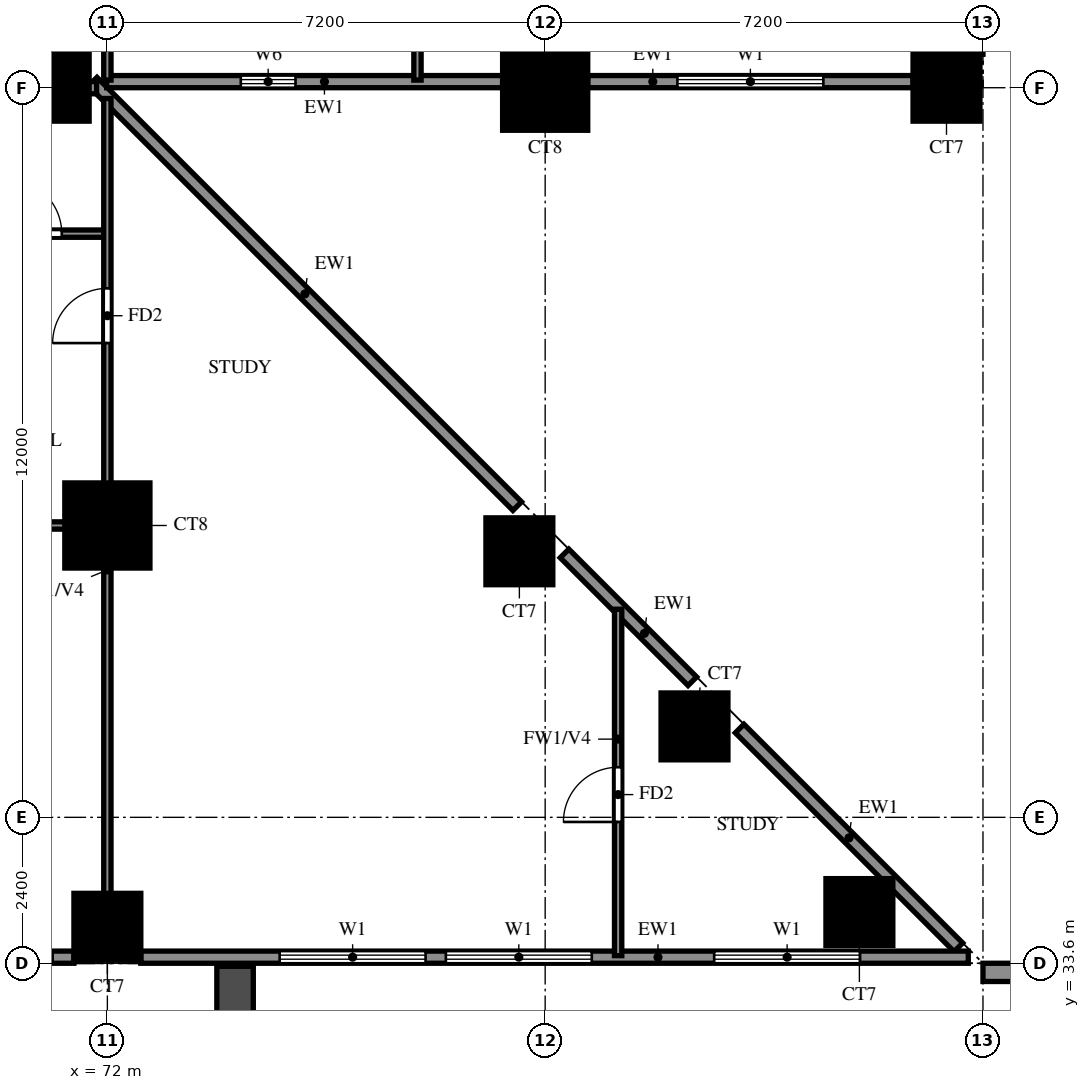
"""IFC4 building model, lengths in metres.
Left out: names, types, materials, properties, quantities, classifications, styles, units other than length and angle.
Written with IfcOpenShell. Run it as: python <this file> out.ifc"""

import sys

from ifc_helpers import new_model, si_unit, direction, frame, frame_2d, origin, origin_2d, place, context, subcontext, project, spatial, rectangle, extrude, source, transform, mapped, element, fill, save


model = new_model("IFC4")
c1 = context("Model", 3, precision=1e-05, world=origin(), true_north=direction((0.0, 1.0)))
c2 = subcontext(c1, "Body", "Model", "MODEL_VIEW")
j1 = project(units=[si_unit("LENGTHUNIT", "METRE"), si_unit("PLANEANGLEUNIT", "RADIAN")], contexts=[c1])
p1 = place(None, origin())
s1 = spatial("IfcSite", under=j1, at=p1, CompositionType="ELEMENT")
p2 = place(p1, origin())
s2 = spatial("IfcBuilding", under=s1, at=p2, CompositionType="ELEMENT")
p3 = place(p2, frame((0.0, 0.0, 48.0)))
s3 = spatial("IfcBuildingStorey", under=s2, at=p3, CompositionType="ELEMENT", Elevation=48.0)
m1 = source(origin(), c2, "Body", "SweptSolid", [
    extrude(rectangle(XDim=1.1, YDim=1.1, at=origin_2d()), origin(), (0.0, 0.0, 1.0), 3.18),
])
for number, where, z_axis, x_axis in (
    (1, (72.0, 34.2, 0.0), (0.0, 0.0, 1.0), (1.0, 0.0, 0.0)),
    (2, (84.367, 34.442, 0.0), (0.0, 0.0, 1.0), (1.0, 0.0, 0.0)),
    (3, (81.656, 37.496, 0.0), (0.0, 0.0, 1.0), (1.0, 0.0, 0.0)),
    (4, (78.776, 40.376, 0.0), (0.0, 0.0, 1.0), (1.0, 0.0, 0.0)),
):
    element("IfcColumn", number, at=place(p3, frame(where, z_axis=z_axis, x_axis=x_axis)), inside=s3, PredefinedType="COLUMN", context=c2, shape_type="MappedRepresentation", body=[
        mapped(m1, transform((0.0, 0.0, 0.0))),
    ])
m2 = source(origin(), c2, "Body", "SweptSolid", [
    extrude(rectangle(XDim=1.4, YDim=1.4, at=origin_2d()), origin(), (0.0, 0.0, 1.0), 3.18),
])
p4 = place(p3, frame((72.0, 40.8, 0.0), z_axis=(0.0, 0.0, 1.0), x_axis=(1.0, 0.0, 0.0)))
e5 = element("IfcColumn", 5, at=p4, inside=s3, PredefinedType="COLUMN", context=c2, shape_type="MappedRepresentation", body=[
    mapped(m2, transform((0.0, 0.0, 0.0))),
])
p5 = place(p3, frame((71.15, 48.0, 0.0), z_axis=(0.0, 0.0, 1.0), x_axis=(1.0, 0.0, 0.0)))
e6 = element("IfcColumn", 6, at=p5, inside=s3, PredefinedType="COLUMN", context=c2, shape_type="MappedRepresentation", body=[
    mapped(m1, transform((0.0, 0.0, 0.0))),
])
p6 = place(p3, frame((79.2, 48.0, 0.0), z_axis=(0.0, 0.0, 1.0), x_axis=(1.0, 0.0, 0.0)))
e7 = element("IfcColumn", 7, at=p6, inside=s3, PredefinedType="COLUMN", context=c2, shape_type="MappedRepresentation", body=[
    mapped(m2, transform((0.0, 0.0, 0.0))),
])
p7 = place(p3, frame((85.8, 48.0, 0.0), z_axis=(0.0, 0.0, 1.0), x_axis=(1.0, 0.0, 0.0)))
e8 = element("IfcColumn", 8, at=p7, inside=s3, PredefinedType="COLUMN", context=c2, shape_type="MappedRepresentation", body=[
    mapped(m1, transform((0.0, 0.0, 0.0))),
])
p8 = place(p3, frame((85.996, 33.863, 0.0), z_axis=(0.0, 0.0, 1.0), x_axis=(-0.7070827891, 0.707130772459, 0.0)))
e9 = element("IfcWall", 9, at=p8, inside=s3, PredefinedType="SOLIDWALL", context=c2, shape_type="SweptSolid", body=[
    extrude(rectangle(XDim=5.088, YDim=0.2, at=frame_2d((2.544, 0.0))), origin(), (0.0, 0.0, 1.0), 3.18),
])
p9 = place(p3, frame((81.62, 38.238, 0.0), z_axis=(0.0, 0.0, 1.0), x_axis=(-0.707106781187, 0.707106781187, 0.0)))
e10 = element("IfcWall", 10, at=p9, inside=s3, PredefinedType="SOLIDWALL", context=c2, shape_type="SweptSolid", body=[
    extrude(rectangle(XDim=2.973, YDim=0.2, at=frame_2d((1.486, 0.0))), origin(), (0.0, 0.0, 1.0), 3.18),
])
p10 = place(p3, frame((78.74, 41.118, 0.0), z_axis=(0.0, 0.0, 1.0), x_axis=(-0.707106781187, 0.707106781187, 0.0)))
e11 = element("IfcWall", 11, at=p10, inside=s3, PredefinedType="SOLIDWALL", context=c2, shape_type="SweptSolid", body=[
    extrude(rectangle(XDim=9.874, YDim=0.2, at=frame_2d((4.937, 0.0))), origin(), (0.0, 0.0, 1.0), 3.18),
])
p11 = place(p3, frame((71.989, 48.1, 0.0), z_axis=(0.0, 0.0, 1.0), x_axis=(1.0, 0.0, 0.0)))
e12 = element("IfcWall", 12, at=p11, inside=s3, PredefinedType="SOLIDWALL", context=c2, shape_type="SweptSolid", body=[
    extrude(rectangle(XDim=6.511, YDim=0.2, at=frame_2d((3.256, 0.0))), origin(), (0.0, 0.0, 1.0), 3.18),
])
p12 = place(p11, frame((2.206, 0.0, 1.5)))
e13 = element("IfcOpeningElement", 13, at=p12, cuts=e12, PredefinedType="OPENING", context=c2, shape_type="SweptSolid", body=[
    extrude(rectangle(XDim=0.9, YDim=0.9, at=frame_2d((0.45, 0.45))), frame((0.0, 0.11, 0.0), z_axis=(0.0, -1.0, 0.0), x_axis=(1.0, 0.0, 0.0)), (0.0, 0.0, 1.0), 0.22),
])
p13 = place(p3, frame((79.9, 48.1, 0.0), z_axis=(0.0, 0.0, 1.0), x_axis=(1.0, 0.0, 0.0)))
e14 = element("IfcWall", 14, at=p13, inside=s3, PredefinedType="SOLIDWALL", context=c2, shape_type="SweptSolid", body=[
    extrude(rectangle(XDim=5.35, YDim=0.2, at=frame_2d((2.675, 0.0))), origin(), (0.0, 0.0, 1.0), 3.18),
])
p14 = place(p13, frame((1.475, 0.0, 0.6)))
e15 = element("IfcOpeningElement", 15, at=p14, cuts=e14, PredefinedType="OPENING", context=c2, shape_type="SweptSolid", body=[
    extrude(rectangle(XDim=2.4, YDim=2.4, at=frame_2d((1.2, 1.2))), frame((0.0, 0.11, 0.0), z_axis=(0.0, -1.0, 0.0), x_axis=(1.0, 0.0, 0.0)), (0.0, 0.0, 1.0), 0.22),
])
p15 = place(p3, frame((86.3, 48.55, 0.0), z_axis=(0.0, 0.0, 1.0), x_axis=(0.0, 1.0, 0.0)))
e16 = element("IfcWall", 16, at=p15, inside=s3, PredefinedType="SOLIDWALL", context=c2, shape_type="SweptSolid", body=[
    extrude(rectangle(XDim=6.1, YDim=0.2, at=frame_2d((3.05, 0.0))), origin(), (0.0, 0.0, 1.0), 3.18),
])
p16 = place(p15, frame((0.725, 0.0, 0.6)))
e17 = element("IfcOpeningElement", 17, at=p16, cuts=e16, PredefinedType="OPENING", context=c2, shape_type="SweptSolid", body=[
    extrude(rectangle(XDim=1.8, YDim=2.4, at=frame_2d((0.9, 1.2))), frame((0.0, 0.11, 0.0), z_axis=(0.0, -1.0, 0.0), x_axis=(1.0, 0.0, 0.0)), (0.0, 0.0, 1.0), 0.22),
])
p17 = place(p15, frame((3.2, 0.0, 0.6)))
e18 = element("IfcOpeningElement", 18, at=p17, cuts=e16, PredefinedType="OPENING", context=c2, shape_type="SweptSolid", body=[
    extrude(rectangle(XDim=0.9, YDim=2.4, at=frame_2d((0.45, 1.2))), frame((0.0, 0.11, 0.0), z_axis=(0.0, -1.0, 0.0), x_axis=(1.0, 0.0, 0.0)), (0.0, 0.0, 1.0), 0.22),
])
p18 = place(p3, frame((65.35, 33.7, 0.0), z_axis=(0.0, 0.0, 1.0), x_axis=(1.0, 0.0, 0.0)))
e19 = element("IfcWall", 19, at=p18, inside=s3, PredefinedType="SOLIDWALL", context=c2, shape_type="SweptSolid", body=[
    extrude(rectangle(XDim=6.1, YDim=0.2, at=frame_2d((3.05, 0.0))), origin(), (0.0, 0.0, 1.0), 3.18),
])
p19 = place(p18, frame((3.95, 0.0, 0.0)))
e20 = element("IfcOpeningElement", 20, at=p19, cuts=e19, PredefinedType="OPENING", context=c2, shape_type="SweptSolid", body=[
    extrude(rectangle(XDim=1.8, YDim=2.4, at=frame_2d((0.9, 1.2))), frame((0.0, 0.11, 0.0), z_axis=(0.0, -1.0, 0.0), x_axis=(1.0, 0.0, 0.0)), (0.0, 0.0, 1.0), 0.22),
])
p20 = place(p18, frame((0.425, 0.0, 0.6)))
e21 = element("IfcOpeningElement", 21, at=p20, cuts=e19, PredefinedType="OPENING", context=c2, shape_type="SweptSolid", body=[
    extrude(rectangle(XDim=1.2, YDim=2.4, at=frame_2d((0.6, 1.2))), frame((0.0, 0.11, 0.0), z_axis=(0.0, -1.0, 0.0), x_axis=(1.0, 0.0, 0.0)), (0.0, 0.0, 1.0), 0.22),
])
p21 = place(p18, frame((2.6, 0.0, 0.6)))
e22 = element("IfcOpeningElement", 22, at=p21, cuts=e19, PredefinedType="OPENING", context=c2, shape_type="SweptSolid", body=[
    extrude(rectangle(XDim=0.9, YDim=2.4, at=frame_2d((0.45, 1.2))), frame((0.0, 0.11, 0.0), z_axis=(0.0, -1.0, 0.0), x_axis=(1.0, 0.0, 0.0)), (0.0, 0.0, 1.0), 0.22),
])
p22 = place(p3, frame((72.55, 33.7, 0.0), z_axis=(0.0, 0.0, 1.0), x_axis=(1.0, 0.0, 0.0)))
e23 = element("IfcWall", 23, at=p22, inside=s3, PredefinedType="SOLIDWALL", context=c2, shape_type="SweptSolid", body=[
    extrude(rectangle(XDim=13.609, YDim=0.2, at=frame_2d((6.804, 0.0))), origin(), (0.0, 0.0, 1.0), 3.18),
])
p23 = place(p22, frame((2.283, 0.0, 0.6)))
e24 = element("IfcOpeningElement", 24, at=p23, cuts=e23, PredefinedType="OPENING", context=c2, shape_type="SweptSolid", body=[
    extrude(rectangle(XDim=2.4, YDim=2.4, at=frame_2d((1.2, 1.2))), frame((0.0, 0.11, 0.0), z_axis=(0.0, -1.0, 0.0), x_axis=(1.0, 0.0, 0.0)), (0.0, 0.0, 1.0), 0.22),
])
p24 = place(p22, frame((5.017, 0.0, 0.6)))
e25 = element("IfcOpeningElement", 25, at=p24, cuts=e23, PredefinedType="OPENING", context=c2, shape_type="SweptSolid", body=[
    extrude(rectangle(XDim=2.4, YDim=2.4, at=frame_2d((1.2, 1.2))), frame((0.0, 0.11, 0.0), z_axis=(0.0, -1.0, 0.0), x_axis=(1.0, 0.0, 0.0)), (0.0, 0.0, 1.0), 0.22),
])
p25 = place(p22, frame((9.429, 0.0, 0.6)))
e26 = element("IfcOpeningElement", 26, at=p25, cuts=e23, PredefinedType="OPENING", context=c2, shape_type="SweptSolid", body=[
    extrude(rectangle(XDim=2.4, YDim=2.4, at=frame_2d((1.2, 1.2))), frame((0.0, 0.11, 0.0), z_axis=(0.0, -1.0, 0.0), x_axis=(1.0, 0.0, 0.0)), (0.0, 0.0, 1.0), 0.22),
])
p26 = place(p3, frame((86.4, 33.45, -0.32), z_axis=(0.0, 0.0, 1.0), x_axis=(1.0, 0.0, 0.0)))
e27 = element("IfcWall", 27, at=p26, inside=s3, PredefinedType="SOLIDWALL", context=c2, shape_type="SweptSolid", body=[
    extrude(rectangle(XDim=2.4, YDim=0.3, at=frame_2d((1.2, 0.0))), origin(), (0.0, 0.0, 1.0), 3.5),
])
p27 = place(p3, frame((74.1, 33.55, 0.0), z_axis=(0.0, 0.0, 1.0), x_axis=(0.0, -1.0, 0.0)))
e28 = element("IfcWall", 28, at=p27, inside=s3, PredefinedType="SOLIDWALL", context=c2, shape_type="SweptSolid", body=[
    extrude(rectangle(XDim=2.65, YDim=0.6, at=frame_2d((1.325, 0.0))), origin(), (0.0, 0.0, 1.0), 2.85),
])
p28 = place(p3, frame((67.2, 48.0, 0.0), z_axis=(0.0, 0.0, 1.0), x_axis=(1.0, 0.0, 0.0)))
e29 = element("IfcWall", 29, at=p28, inside=s3, PredefinedType="SOLIDWALL", context=c2, shape_type="SweptSolid", body=[
    extrude(rectangle(XDim=4.623, YDim=0.2, at=frame_2d((2.312, 0.0))), origin(), (0.0, 0.0, 1.0), 3.18),
])
p29 = place(p3, frame((60.0, 40.8, 0.0), z_axis=(0.0, 0.0, 1.0), x_axis=(1.0, 0.0, 0.0)))
e30 = element("IfcWall", 30, at=p29, inside=s3, PredefinedType="PARTITIONING", context=c2, shape_type="SweptSolid", body=[
    extrude(rectangle(XDim=12.0, YDim=0.12, at=frame_2d((6.0, 0.0))), origin(), (0.0, 0.0, 1.0), 3.18),
])
p30 = place(p29, frame((7.65, 0.0, 0.0)))
e31 = element("IfcOpeningElement", 31, at=p30, cuts=e30, PredefinedType="OPENING", context=c2, shape_type="SweptSolid", body=[
    extrude(rectangle(XDim=1.5, YDim=2.1, at=frame_2d((0.75, 1.05))), frame((0.0, 0.07, 0.0), z_axis=(0.0, -1.0, 0.0), x_axis=(1.0, 0.0, 0.0)), (0.0, 0.0, 1.0), 0.14),
])
p31 = place(p29, frame((1.95, 0.0, 0.0)))
e32 = element("IfcOpeningElement", 32, at=p31, cuts=e30, PredefinedType="OPENING", context=c2, shape_type="SweptSolid", body=[
    extrude(rectangle(XDim=0.9, YDim=2.1, at=frame_2d((0.45, 1.05))), frame((0.0, 0.07, 0.0), z_axis=(0.0, -1.0, 0.0), x_axis=(1.0, 0.0, 0.0)), (0.0, 0.0, 1.0), 0.14),
])
p32 = place(p3, frame((67.2, 45.6, 0.0), z_axis=(0.0, 0.0, 1.0), x_axis=(1.0, 0.0, 0.0)))
e33 = element("IfcWall", 33, at=p32, inside=s3, PredefinedType="PARTITIONING", context=c2, shape_type="SweptSolid", body=[
    extrude(rectangle(XDim=4.8, YDim=0.12, at=frame_2d((2.4, 0.0))), origin(), (0.0, 0.0, 1.0), 3.18),
])
p33 = place(p32, frame((3.15, 0.0, 0.0)))
e34 = element("IfcOpeningElement", 34, at=p33, cuts=e33, PredefinedType="OPENING", context=c2, shape_type="SweptSolid", body=[
    extrude(rectangle(XDim=0.9, YDim=2.1, at=frame_2d((0.45, 1.05))), frame((0.0, 0.07, 0.0), z_axis=(0.0, -1.0, 0.0), x_axis=(1.0, 0.0, 0.0)), (0.0, 0.0, 1.0), 0.14),
])
p34 = place(p3, frame((72.0, 33.725, 0.0), z_axis=(0.0, 0.0, 1.0), x_axis=(0.0, 1.0, 0.0)))
e35 = element("IfcWall", 35, at=p34, inside=s3, PredefinedType="PARTITIONING", context=c2, shape_type="SweptSolid", body=[
    extrude(rectangle(XDim=14.098, YDim=0.12, at=frame_2d((7.049, 0.0))), origin(), (0.0, 0.0, 1.0), 2.28),
])
p35 = place(p34, frame((10.075, 0.0, 0.0)))
e36 = element("IfcOpeningElement", 36, at=p35, cuts=e35, PredefinedType="OPENING", context=c2, shape_type="SweptSolid", body=[
    extrude(rectangle(XDim=0.9, YDim=2.1, at=frame_2d((0.45, 1.05))), frame((0.0, 0.07, 0.0), z_axis=(0.0, -1.0, 0.0), x_axis=(1.0, 0.0, 0.0)), (0.0, 0.0, 1.0), 0.14),
])
p36 = place(p3, frame((72.0, 48.125, 0.0), z_axis=(0.0, 0.0, 1.0), x_axis=(0.0, 1.0, 0.0)))
e37 = element("IfcWall", 37, at=p36, inside=s3, PredefinedType="PARTITIONING", context=c2, shape_type="SweptSolid", body=[
    extrude(rectangle(XDim=7.075, YDim=0.12, at=frame_2d((3.538, 0.0))), origin(), (0.0, 0.0, 1.0), 3.18),
])
p37 = place(p3, frame((77.1, 48.125, 0.0), z_axis=(0.0, 0.0, 1.0), x_axis=(0.0, 1.0, 0.0)))
e38 = element("IfcWall", 38, at=p37, inside=s3, PredefinedType="PARTITIONING", context=c2, shape_type="SweptSolid", body=[
    extrude(rectangle(XDim=7.075, YDim=0.12, at=frame_2d((3.538, 0.0))), origin(), (0.0, 0.0, 1.0), 3.18),
])
p38 = place(p37, frame((1.363, 0.0, 0.0)))
e39 = element("IfcOpeningElement", 39, at=p38, cuts=e38, PredefinedType="OPENING", context=c2, shape_type="SweptSolid", body=[
    extrude(rectangle(XDim=0.8, YDim=2.1, at=frame_2d((0.4, 1.05))), frame((0.0, 0.07, 0.0), z_axis=(0.0, -1.0, 0.0), x_axis=(1.0, 0.0, 0.0)), (0.0, 0.0, 1.0), 0.14),
])
p39 = place(p3, frame((79.2, 48.125, 0.0), z_axis=(0.0, 0.0, 1.0), x_axis=(0.0, 1.0, 0.0)))
e40 = element("IfcWall", 40, at=p39, inside=s3, PredefinedType="PARTITIONING", context=c2, shape_type="SweptSolid", body=[
    extrude(rectangle(XDim=17.875, YDim=0.12, at=frame_2d((8.938, 0.0))), origin(), (0.0, 0.0, 1.0), 3.18),
])
p40 = place(p39, frame((1.288, 0.0, 0.0)))
e41 = element("IfcOpeningElement", 41, at=p40, cuts=e40, PredefinedType="OPENING", context=c2, shape_type="SweptSolid", body=[
    extrude(rectangle(XDim=0.9, YDim=2.1, at=frame_2d((0.45, 1.05))), frame((0.0, 0.07, 0.0), z_axis=(0.0, -1.0, 0.0), x_axis=(1.0, 0.0, 0.0)), (0.0, 0.0, 1.0), 0.14),
])
p41 = place(p39, frame((7.825, 0.0, 0.0)))
e42 = element("IfcOpeningElement", 42, at=p41, cuts=e40, PredefinedType="OPENING", context=c2, shape_type="SweptSolid", body=[
    extrude(rectangle(XDim=1.5, YDim=2.1, at=frame_2d((0.75, 1.05))), frame((0.0, 0.07, 0.0), z_axis=(0.0, -1.0, 0.0), x_axis=(1.0, 0.0, 0.0)), (0.0, 0.0, 1.0), 0.14),
])
p42 = place(p39, frame((12.025, 0.0, 0.0)))
e43 = element("IfcOpeningElement", 43, at=p42, cuts=e40, PredefinedType="OPENING", context=c2, shape_type="SweptSolid", body=[
    extrude(rectangle(XDim=0.9, YDim=2.1, at=frame_2d((0.45, 1.05))), frame((0.0, 0.07, 0.0), z_axis=(0.0, -1.0, 0.0), x_axis=(1.0, 0.0, 0.0)), (0.0, 0.0, 1.0), 0.14),
])
p43 = place(p39, frame((15.625, 0.0, 0.0)))
e44 = element("IfcOpeningElement", 44, at=p43, cuts=e40, PredefinedType="OPENING", context=c2, shape_type="SweptSolid", body=[
    extrude(rectangle(XDim=0.9, YDim=2.1, at=frame_2d((0.45, 1.05))), frame((0.0, 0.07, 0.0), z_axis=(0.0, -1.0, 0.0), x_axis=(1.0, 0.0, 0.0)), (0.0, 0.0, 1.0), 0.14),
])
p44 = place(p3, frame((80.4, 33.725, 0.0), z_axis=(0.0, 0.0, 1.0), x_axis=(0.0, 1.0, 0.0)))
e45 = element("IfcWall", 45, at=p44, inside=s3, PredefinedType="PARTITIONING", context=c2, shape_type="SweptSolid", body=[
    extrude(rectangle(XDim=5.698, YDim=0.12, at=frame_2d((2.849, 0.0))), origin(), (0.0, 0.0, 1.0), 2.28),
])
p45 = place(p44, frame((2.199, 0.0, 0.0)))
e46 = element("IfcOpeningElement", 46, at=p45, cuts=e45, PredefinedType="OPENING", context=c2, shape_type="SweptSolid", body=[
    extrude(rectangle(XDim=0.9, YDim=2.1, at=frame_2d((0.45, 1.05))), frame((0.0, 0.07, 0.0), z_axis=(0.0, -1.0, 0.0), x_axis=(1.0, 0.0, 0.0)), (0.0, 0.0, 1.0), 0.14),
])
p46 = place(p12, origin())
e47 = element("IfcWindow", 47, at=p46, inside=s3, PartitioningType="SINGLE_PANEL", PredefinedType="WINDOW", context=c2, shape_type="SweptSolid", body=[
    extrude(rectangle(XDim=0.9, YDim=0.9, at=frame_2d((0.45, 0.45))), frame((0.0, 0.03, 0.0), z_axis=(0.0, -1.0, 0.0), x_axis=(1.0, 0.0, 0.0)), (0.0, 0.0, 1.0), 0.06),
])
fill(e13, e47)
p47 = place(p14, origin())
e48 = element("IfcWindow", 48, at=p47, inside=s3, PartitioningType="DOUBLE_PANEL_VERTICAL", PredefinedType="WINDOW", context=c2, shape_type="SweptSolid", body=[
    extrude(rectangle(XDim=2.4, YDim=2.4, at=frame_2d((1.2, 1.2))), frame((0.0, 0.03, 0.0), z_axis=(0.0, -1.0, 0.0), x_axis=(1.0, 0.0, 0.0)), (0.0, 0.0, 1.0), 0.06),
])
fill(e15, e48)
p48 = place(p23, origin())
e49 = element("IfcWindow", 49, at=p48, inside=s3, PartitioningType="DOUBLE_PANEL_VERTICAL", PredefinedType="WINDOW", context=c2, shape_type="SweptSolid", body=[
    extrude(rectangle(XDim=2.4, YDim=2.4, at=frame_2d((1.2, 1.2))), frame((0.0, 0.03, 0.0), z_axis=(0.0, -1.0, 0.0), x_axis=(1.0, 0.0, 0.0)), (0.0, 0.0, 1.0), 0.06),
])
fill(e24, e49)
p49 = place(p24, origin())
e50 = element("IfcWindow", 50, at=p49, inside=s3, PartitioningType="DOUBLE_PANEL_VERTICAL", PredefinedType="WINDOW", context=c2, shape_type="SweptSolid", body=[
    extrude(rectangle(XDim=2.4, YDim=2.4, at=frame_2d((1.2, 1.2))), frame((0.0, 0.03, 0.0), z_axis=(0.0, -1.0, 0.0), x_axis=(1.0, 0.0, 0.0)), (0.0, 0.0, 1.0), 0.06),
])
fill(e25, e50)
p50 = place(p25, origin())
e51 = element("IfcWindow", 51, at=p50, inside=s3, PartitioningType="DOUBLE_PANEL_VERTICAL", PredefinedType="WINDOW", context=c2, shape_type="SweptSolid", body=[
    extrude(rectangle(XDim=2.4, YDim=2.4, at=frame_2d((1.2, 1.2))), frame((0.0, 0.03, 0.0), z_axis=(0.0, -1.0, 0.0), x_axis=(1.0, 0.0, 0.0)), (0.0, 0.0, 1.0), 0.06),
])
fill(e26, e51)
p51 = place(p33, origin())
e52 = element("IfcDoor", 52, at=p51, inside=s3, OperationType="SINGLE_SWING_LEFT", PredefinedType="DOOR", context=c2, shape_type="SweptSolid", body=[
    extrude(rectangle(XDim=0.9, YDim=2.1, at=frame_2d((0.45, 1.05))), frame((0.0, 0.025, 0.0), z_axis=(0.0, -1.0, 0.0), x_axis=(1.0, 0.0, 0.0)), (0.0, 0.0, 1.0), 0.05),
])
fill(e34, e52)
p52 = place(p35, origin())
e53 = element("IfcDoor", 53, at=p52, inside=s3, OperationType="SINGLE_SWING_LEFT", PredefinedType="DOOR", context=c2, shape_type="SweptSolid", body=[
    extrude(rectangle(XDim=0.9, YDim=2.1, at=frame_2d((0.45, 1.05))), frame((0.0, 0.025, 0.0), z_axis=(0.0, -1.0, 0.0), x_axis=(1.0, 0.0, 0.0)), (0.0, 0.0, 1.0), 0.05),
])
fill(e36, e53)
p53 = place(p45, origin())
e54 = element("IfcDoor", 54, at=p53, inside=s3, OperationType="SINGLE_SWING_LEFT", PredefinedType="DOOR", context=c2, shape_type="SweptSolid", body=[
    extrude(rectangle(XDim=0.9, YDim=2.1, at=frame_2d((0.45, 1.05))), frame((0.0, 0.025, 0.0), z_axis=(0.0, -1.0, 0.0), x_axis=(1.0, 0.0, 0.0)), (0.0, 0.0, 1.0), 0.05),
])
fill(e46, e54)
save(model, sys.argv[1])
